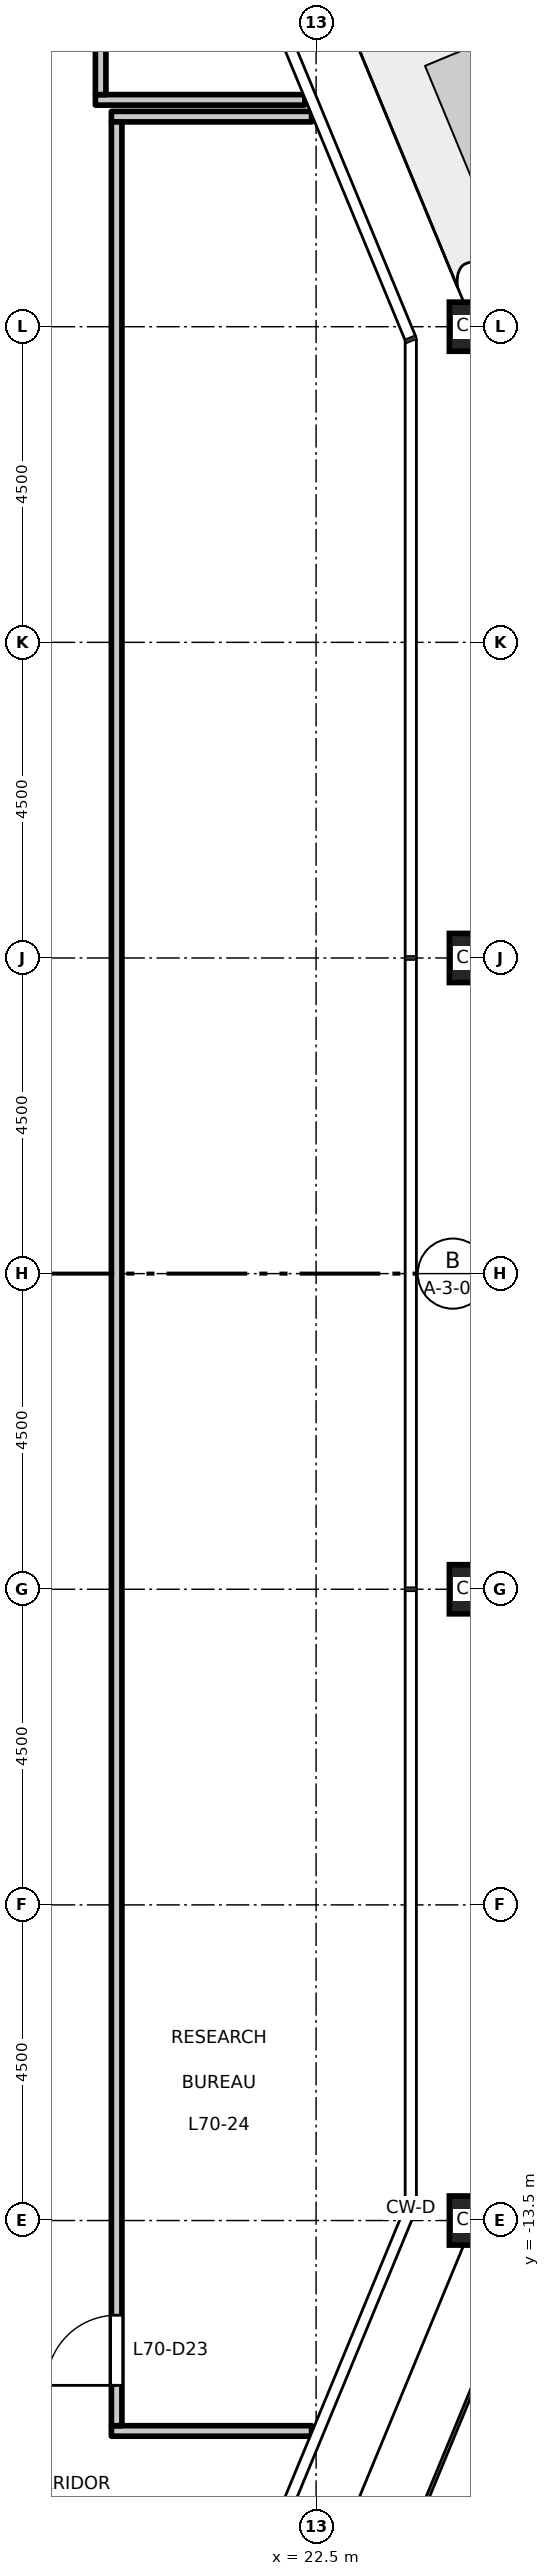
"""IFC4 building model, lengths in metres.
Left out: names, types, materials, properties, quantities, classifications, styles, units other than length and angle.
Written with IfcOpenShell. Run it as: python <this file> out.ifc"""

import sys

from ifc_helpers import new_model, si_unit, direction, frame, frame_2d, origin, origin_2d, place, context, subcontext, project, spatial, rectangle, hollow_rectangle, extrude, element, fill, save


model = new_model("IFC4")
c1 = context("Model", 3, precision=1e-05, world=origin(), true_north=direction((0.0, 1.0)))
c2 = subcontext(c1, "Body", "Model", "MODEL_VIEW")
j1 = project(units=[si_unit("LENGTHUNIT", "METRE"), si_unit("PLANEANGLEUNIT", "RADIAN")], contexts=[c1])
p1 = place(None, origin())
s1 = spatial("IfcSite", under=j1, at=p1, CompositionType="ELEMENT")
p2 = place(p1, origin())
s2 = spatial("IfcBuilding", under=s1, at=p2, CompositionType="ELEMENT")
p3 = place(p2, frame((0.0, 0.0, 325.7)))
s3 = spatial("IfcBuildingStorey", under=s2, at=p3, CompositionType="ELEMENT", Elevation=325.7)
for number, where, z_axis, x_axis in (
    (1, (24.75, -13.5, 0.0), (0.0, 0.0, 1.0), (1.0, 0.0, 0.0)),
    (2, (24.75, -4.5, 0.0), (0.0, 0.0, 1.0), (1.0, 0.0, 0.0)),
    (3, (24.75, 4.5, 0.0), (0.0, 0.0, 1.0), (1.0, 0.0, 0.0)),
    (4, (24.75, 13.5, 0.0), (0.0, 0.0, 1.0), (1.0, 0.0, 0.0)),
):
    element("IfcColumn", number, at=place(p3, frame(where, z_axis=z_axis, x_axis=x_axis)), inside=s3, PredefinedType="COLUMN", context=c2, shape_type="SweptSolid", body=[
        extrude(hollow_rectangle(XDim=0.7, YDim=0.7, WallThickness=0.036, at=origin_2d()), origin(), (0.0, 0.0, 1.0), 4.5),
    ])
for number, where, z_axis, x_axis in (
    (5, (19.581, -16.5, 0.0), (0.0, 0.0, 1.0), (1.0, 0.0, 0.0)),
    (6, (19.581, 16.495, 0.0), (0.0, 0.0, 1.0), (1.0, 0.0, 0.0)),
):
    element("IfcWall", number, at=place(p3, frame(where, z_axis=z_axis, x_axis=x_axis)), inside=s3, PredefinedType="PARTITIONING", context=c2, shape_type="SweptSolid", body=[
        extrude(rectangle(XDim=2.855, YDim=0.15, at=frame_2d((1.427, 0.0))), origin(), (0.0, 0.0, 1.0), 4.35),
    ])
p4 = place(p3, frame((19.353, 16.734, 0.0), z_axis=(0.0, 0.0, 1.0), x_axis=(1.0, 0.0, 0.0)))
e7 = element("IfcWall", 7, at=p4, inside=s3, PredefinedType="PARTITIONING", context=c2, shape_type="SweptSolid", body=[
    extrude(rectangle(XDim=2.986, YDim=0.15, at=frame_2d((1.493, 0.0))), origin(), (0.0, 0.0, 1.0), 4.35),
])
p5 = place(p3, frame((19.428, 16.809, 0.0), z_axis=(0.0, 0.0, 1.0), x_axis=(0.0, 1.0, 0.0)))
e8 = element("IfcWall", 8, at=p5, inside=s3, PredefinedType="PARTITIONING", context=c2, shape_type="SweptSolid", body=[
    extrude(rectangle(XDim=2.016, YDim=0.15, at=frame_2d((1.008, 0.0))), origin(), (0.0, 0.0, 1.0), 4.35),
])
p6 = place(p3, frame((19.656, -16.425, 0.0), z_axis=(0.0, 0.0, 1.0), x_axis=(0.0, 1.0, 0.0)))
e9 = element("IfcWall", 9, at=p6, inside=s3, PredefinedType="PARTITIONING", context=c2, shape_type="SweptSolid", body=[
    extrude(rectangle(XDim=32.845, YDim=0.15, at=frame_2d((16.422, 0.0))), origin(), (0.0, 0.0, 1.0), 4.35),
])
p7 = place(p6, frame((0.575, 0.0, 0.0)))
e10 = element("IfcOpeningElement", 10, at=p7, cuts=e9, PredefinedType="OPENING", context=c2, shape_type="SweptSolid", body=[
    extrude(rectangle(XDim=1.0, YDim=2.1, at=frame_2d((0.5, 1.05))), frame((0.0, 0.085, 0.0), z_axis=(0.0, -1.0, 0.0), x_axis=(1.0, 0.0, 0.0)), (0.0, 0.0, 1.0), 0.17),
])
p8 = place(p7, origin())
e11 = element("IfcDoor", 11, at=p8, inside=s3, OperationType="SINGLE_SWING_LEFT", PredefinedType="DOOR", context=c2, shape_type="SweptSolid", body=[
    extrude(rectangle(XDim=1.0, YDim=2.1, at=frame_2d((0.5, 1.05))), frame((0.0, 0.025, 0.0), z_axis=(0.0, -1.0, 0.0), x_axis=(1.0, 0.0, 0.0)), (0.0, 0.0, 1.0), 0.05),
])
fill(e10, e11)
save(model, sys.argv[1])
